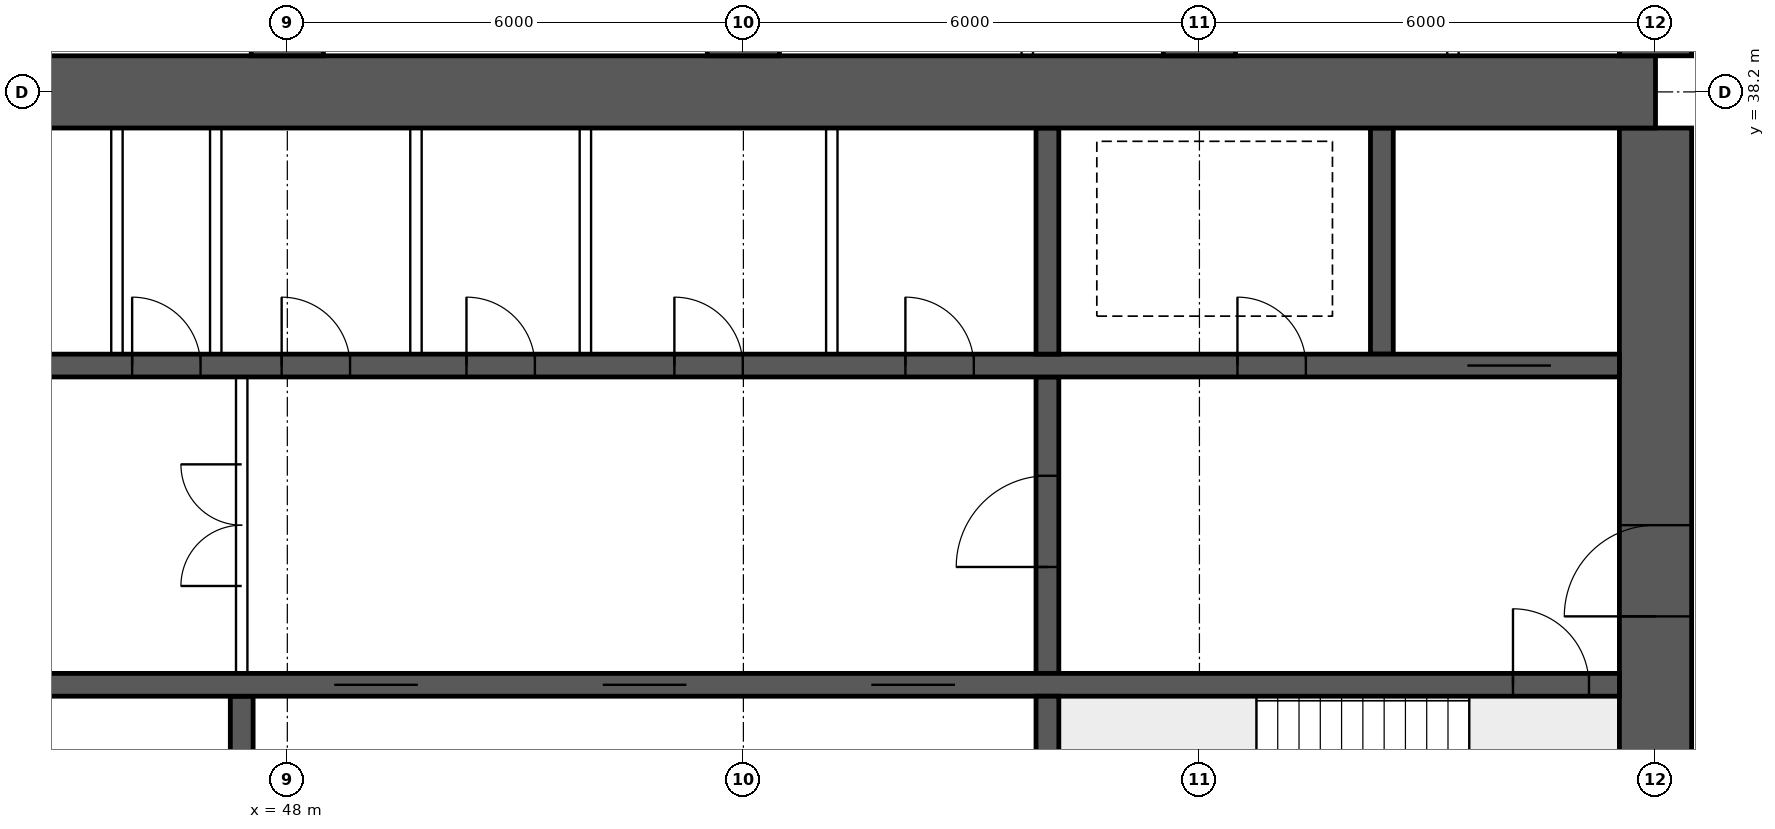
"""IFC4 building model, lengths in metres.
Left out: names, types, materials, properties, quantities, classifications, styles, units other than length and angle.
Written with IfcOpenShell. Run it as: python <this file> out.ifc"""

import sys

from ifc_helpers import new_model, si_unit, direction, frame, frame_2d, origin, place, context, subcontext, project, spatial, rectangle, extrude, element, fill, save


model = new_model("IFC4")
c1 = context("Model", 3, precision=1e-05, world=origin(), true_north=direction((0.0, 1.0)))
c2 = subcontext(c1, "Body", "Model", "MODEL_VIEW")
j1 = project(units=[si_unit("LENGTHUNIT", "METRE"), si_unit("PLANEANGLEUNIT", "RADIAN")], contexts=[c1])
p1 = place(None, origin())
s1 = spatial("IfcSite", under=j1, at=p1, CompositionType="ELEMENT")
p2 = place(p1, origin())
s2 = spatial("IfcBuilding", under=s1, at=p2, CompositionType="ELEMENT")
p3 = place(p2, frame((0.0, 0.0, 121.9)))
s3 = spatial("IfcBuildingStorey", under=s2, at=p3, CompositionType="ELEMENT", Elevation=121.9)
p4 = place(p3, frame((18.0, 38.2, 0.0), z_axis=(0.0, 0.0, 1.0), x_axis=(1.0, 0.0, 0.0)))
e1 = element("IfcWall", 1, at=p4, inside=s3, PredefinedType="SHEAR", context=c2, shape_type="SweptSolid", body=[
    extrude(rectangle(XDim=48.0, YDim=0.95, at=frame_2d((24.0, 0.0))), origin(), (0.0, 0.0, 1.0), 3.75),
])
p5 = place(p3, frame((66.0, 26.275, 0.0), z_axis=(0.0, 0.0, 1.0), x_axis=(0.0, 1.0, 0.0)))
e2 = element("IfcWall", 2, at=p5, inside=s3, PredefinedType="SHEAR", context=c2, shape_type="SweptSolid", body=[
    extrude(rectangle(XDim=11.45, YDim=0.95, at=frame_2d((5.725, 0.0))), origin(), (0.0, 0.0, 1.0), 3.75),
])
p6 = place(p5, frame((5.025, 0.0, 0.0)))
e3 = element("IfcOpeningElement", 3, at=p6, cuts=e2, PredefinedType="OPENING", context=c2, shape_type="SweptSolid", body=[
    extrude(rectangle(XDim=1.2, YDim=2.1, at=frame_2d((0.6, 1.05))), frame((0.0, 0.485, 0.0), z_axis=(0.0, -1.0, 0.0), x_axis=(1.0, 0.0, 0.0)), (0.0, 0.0, 1.0), 0.97),
])
p7 = place(p3, frame((18.475, 30.4, 0.0), z_axis=(0.0, 0.0, 1.0), x_axis=(1.0, 0.0, 0.0)))
e4 = element("IfcWall", 4, at=p7, inside=s3, PredefinedType="SHEAR", context=c2, shape_type="SweptSolid", body=[
    extrude(rectangle(XDim=47.05, YDim=0.3, at=frame_2d((23.525, 0.0))), origin(), (0.0, 0.0, 1.0), 3.75),
])
p8 = place(p7, frame((0.4, 0.0, 0.0)))
e5 = element("IfcOpeningElement", 5, at=p8, cuts=e4, PredefinedType="OPENING", context=c2, shape_type="SweptSolid", body=[
    extrude(rectangle(XDim=1.0, YDim=2.1, at=frame_2d((0.5, 1.05))), frame((0.0, 0.16, 0.0), z_axis=(0.0, -1.0, 0.0), x_axis=(1.0, 0.0, 0.0)), (0.0, 0.0, 1.0), 0.32),
])
p9 = place(p7, frame((45.65, 0.0, 0.0)))
e6 = element("IfcOpeningElement", 6, at=p9, cuts=e4, PredefinedType="OPENING", context=c2, shape_type="SweptSolid", body=[
    extrude(rectangle(XDim=1.0, YDim=2.1, at=frame_2d((0.5, 1.05))), frame((0.0, 0.16, 0.0), z_axis=(0.0, -1.0, 0.0), x_axis=(1.0, 0.0, 0.0)), (0.0, 0.0, 1.0), 0.32),
])
p10 = place(p7, frame((8.275, 0.0, 0.0)))
e7 = element("IfcOpeningElement", 7, at=p10, cuts=e4, PredefinedType="OPENING", context=c2, shape_type="SweptSolid", body=[
    extrude(rectangle(XDim=1.1, YDim=2.1, at=frame_2d((0.55, 1.05))), frame((0.0, 0.16, 0.0), z_axis=(0.0, -1.0, 0.0), x_axis=(1.0, 0.0, 0.0)), (0.0, 0.0, 1.0), 0.32),
])
p11 = place(p7, frame((10.875, 0.0, 0.0)))
e8 = element("IfcOpeningElement", 8, at=p11, cuts=e4, PredefinedType="OPENING", context=c2, shape_type="SweptSolid", body=[
    extrude(rectangle(XDim=1.1, YDim=2.1, at=frame_2d((0.55, 1.05))), frame((0.0, 0.16, 0.0), z_axis=(0.0, -1.0, 0.0), x_axis=(1.0, 0.0, 0.0)), (0.0, 0.0, 1.0), 0.32),
])
p12 = place(p7, frame((13.475, 0.0, 0.0)))
e9 = element("IfcOpeningElement", 9, at=p12, cuts=e4, PredefinedType="OPENING", context=c2, shape_type="SweptSolid", body=[
    extrude(rectangle(XDim=1.1, YDim=2.1, at=frame_2d((0.55, 1.05))), frame((0.0, 0.16, 0.0), z_axis=(0.0, -1.0, 0.0), x_axis=(1.0, 0.0, 0.0)), (0.0, 0.0, 1.0), 0.32),
])
p13 = place(p7, frame((16.075, 0.0, 0.0)))
e10 = element("IfcOpeningElement", 10, at=p13, cuts=e4, PredefinedType="OPENING", context=c2, shape_type="SweptSolid", body=[
    extrude(rectangle(XDim=1.1, YDim=2.1, at=frame_2d((0.55, 1.05))), frame((0.0, 0.16, 0.0), z_axis=(0.0, -1.0, 0.0), x_axis=(1.0, 0.0, 0.0)), (0.0, 0.0, 1.0), 0.32),
])
p14 = place(p7, frame((18.85, 0.0, 0.0)))
e11 = element("IfcOpeningElement", 11, at=p14, cuts=e4, PredefinedType="OPENING", context=c2, shape_type="SweptSolid", body=[
    extrude(rectangle(XDim=0.9, YDim=2.1, at=frame_2d((0.45, 1.05))), frame((0.0, 0.16, 0.0), z_axis=(0.0, -1.0, 0.0), x_axis=(1.0, 0.0, 0.0)), (0.0, 0.0, 1.0), 0.32),
])
p15 = place(p7, frame((30.142, 0.0, 0.0)))
e12 = element("IfcOpeningElement", 12, at=p15, cuts=e4, PredefinedType="OPENING", context=c2, shape_type="SweptSolid", body=[
    extrude(rectangle(XDim=1.1, YDim=2.1, at=frame_2d((0.55, 1.05))), frame((0.0, 0.16, 0.0), z_axis=(0.0, -1.0, 0.0), x_axis=(1.0, 0.0, 0.0)), (0.0, 0.0, 1.0), 0.32),
])
p16 = place(p7, frame((33.675, 0.0, 0.0)))
e13 = element("IfcOpeningElement", 13, at=p16, cuts=e4, PredefinedType="OPENING", context=c2, shape_type="SweptSolid", body=[
    extrude(rectangle(XDim=1.1, YDim=2.1, at=frame_2d((0.55, 1.05))), frame((0.0, 0.16, 0.0), z_axis=(0.0, -1.0, 0.0), x_axis=(1.0, 0.0, 0.0)), (0.0, 0.0, 1.0), 0.32),
])
p17 = place(p7, frame((37.208, 0.0, 0.0)))
e14 = element("IfcOpeningElement", 14, at=p17, cuts=e4, PredefinedType="OPENING", context=c2, shape_type="SweptSolid", body=[
    extrude(rectangle(XDim=1.1, YDim=2.1, at=frame_2d((0.55, 1.05))), frame((0.0, 0.16, 0.0), z_axis=(0.0, -1.0, 0.0), x_axis=(1.0, 0.0, 0.0)), (0.0, 0.0, 1.0), 0.32),
])
p18 = place(p3, frame((18.475, 34.6, 0.0), z_axis=(0.0, 0.0, 1.0), x_axis=(1.0, 0.0, 0.0)))
e15 = element("IfcWall", 15, at=p18, inside=s3, PredefinedType="SHEAR", context=c2, shape_type="SweptSolid", body=[
    extrude(rectangle(XDim=47.05, YDim=0.3, at=frame_2d((23.525, 0.0))), origin(), (0.0, 0.0, 1.0), 3.75),
])
p19 = place(p18, frame((0.9, 0.0, 0.0)))
e16 = element("IfcOpeningElement", 16, at=p19, cuts=e15, PredefinedType="OPENING", context=c2, shape_type="SweptSolid", body=[
    extrude(rectangle(XDim=1.1, YDim=2.1, at=frame_2d((0.55, 1.05))), frame((0.0, 0.16, 0.0), z_axis=(0.0, -1.0, 0.0), x_axis=(1.0, 0.0, 0.0)), (0.0, 0.0, 1.0), 0.32),
])
p20 = place(p18, frame((45.05, 0.0, 0.0)))
e17 = element("IfcOpeningElement", 17, at=p20, cuts=e15, PredefinedType="OPENING", context=c2, shape_type="SweptSolid", body=[
    extrude(rectangle(XDim=1.1, YDim=2.1, at=frame_2d((0.55, 1.05))), frame((0.0, 0.16, 0.0), z_axis=(0.0, -1.0, 0.0), x_axis=(1.0, 0.0, 0.0)), (0.0, 0.0, 1.0), 0.32),
])
p21 = place(p18, frame((4.125, 0.0, 0.0)))
e18 = element("IfcOpeningElement", 18, at=p21, cuts=e15, PredefinedType="OPENING", context=c2, shape_type="SweptSolid", body=[
    extrude(rectangle(XDim=0.9, YDim=2.1, at=frame_2d((0.45, 1.05))), frame((0.0, 0.16, 0.0), z_axis=(0.0, -1.0, 0.0), x_axis=(1.0, 0.0, 0.0)), (0.0, 0.0, 1.0), 0.32),
])
p22 = place(p18, frame((42.025, 0.0, 0.0)))
e19 = element("IfcOpeningElement", 19, at=p22, cuts=e15, PredefinedType="OPENING", context=c2, shape_type="SweptSolid", body=[
    extrude(rectangle(XDim=0.9, YDim=2.1, at=frame_2d((0.45, 1.05))), frame((0.0, 0.16, 0.0), z_axis=(0.0, -1.0, 0.0), x_axis=(1.0, 0.0, 0.0)), (0.0, 0.0, 1.0), 0.32),
])
p23 = place(p18, frame((8.9, 0.0, 0.0)))
e20 = element("IfcOpeningElement", 20, at=p23, cuts=e15, PredefinedType="OPENING", context=c2, shape_type="SweptSolid", body=[
    extrude(rectangle(XDim=0.9, YDim=2.1, at=frame_2d((0.45, 1.05))), frame((0.0, 0.16, 0.0), z_axis=(0.0, -1.0, 0.0), x_axis=(1.0, 0.0, 0.0)), (0.0, 0.0, 1.0), 0.32),
])
p24 = place(p18, frame((12.874, 0.0, 0.0)))
e21 = element("IfcOpeningElement", 21, at=p24, cuts=e15, PredefinedType="OPENING", context=c2, shape_type="SweptSolid", body=[
    extrude(rectangle(XDim=0.9, YDim=2.1, at=frame_2d((0.45, 1.05))), frame((0.0, 0.16, 0.0), z_axis=(0.0, -1.0, 0.0), x_axis=(1.0, 0.0, 0.0)), (0.0, 0.0, 1.0), 0.32),
])
p25 = place(p18, frame((16.521, 0.0, 0.0)))
e22 = element("IfcOpeningElement", 22, at=p25, cuts=e15, PredefinedType="OPENING", context=c2, shape_type="SweptSolid", body=[
    extrude(rectangle(XDim=0.9, YDim=2.1, at=frame_2d((0.45, 1.05))), frame((0.0, 0.16, 0.0), z_axis=(0.0, -1.0, 0.0), x_axis=(1.0, 0.0, 0.0)), (0.0, 0.0, 1.0), 0.32),
])
p26 = place(p18, frame((20.28, 0.0, 0.0)))
e23 = element("IfcOpeningElement", 23, at=p26, cuts=e15, PredefinedType="OPENING", context=c2, shape_type="SweptSolid", body=[
    extrude(rectangle(XDim=0.9, YDim=2.1, at=frame_2d((0.45, 1.05))), frame((0.0, 0.16, 0.0), z_axis=(0.0, -1.0, 0.0), x_axis=(1.0, 0.0, 0.0)), (0.0, 0.0, 1.0), 0.32),
])
p27 = place(p18, frame((24.686, 0.0, 0.0)))
e24 = element("IfcOpeningElement", 24, at=p27, cuts=e15, PredefinedType="OPENING", context=c2, shape_type="SweptSolid", body=[
    extrude(rectangle(XDim=0.9, YDim=2.1, at=frame_2d((0.45, 1.05))), frame((0.0, 0.16, 0.0), z_axis=(0.0, -1.0, 0.0), x_axis=(1.0, 0.0, 0.0)), (0.0, 0.0, 1.0), 0.32),
])
p28 = place(p18, frame((27.483, 0.0, 0.0)))
e25 = element("IfcOpeningElement", 25, at=p28, cuts=e15, PredefinedType="OPENING", context=c2, shape_type="SweptSolid", body=[
    extrude(rectangle(XDim=0.9, YDim=2.1, at=frame_2d((0.45, 1.05))), frame((0.0, 0.16, 0.0), z_axis=(0.0, -1.0, 0.0), x_axis=(1.0, 0.0, 0.0)), (0.0, 0.0, 1.0), 0.32),
])
p29 = place(p18, frame((29.45, 0.0, 0.0)))
e26 = element("IfcOpeningElement", 26, at=p29, cuts=e15, PredefinedType="OPENING", context=c2, shape_type="SweptSolid", body=[
    extrude(rectangle(XDim=0.9, YDim=2.1, at=frame_2d((0.45, 1.05))), frame((0.0, 0.16, 0.0), z_axis=(0.0, -1.0, 0.0), x_axis=(1.0, 0.0, 0.0)), (0.0, 0.0, 1.0), 0.32),
])
p30 = place(p18, frame((31.882, 0.0, 0.0)))
e27 = element("IfcOpeningElement", 27, at=p30, cuts=e15, PredefinedType="OPENING", context=c2, shape_type="SweptSolid", body=[
    extrude(rectangle(XDim=0.9, YDim=2.1, at=frame_2d((0.45, 1.05))), frame((0.0, 0.16, 0.0), z_axis=(0.0, -1.0, 0.0), x_axis=(1.0, 0.0, 0.0)), (0.0, 0.0, 1.0), 0.32),
])
p31 = place(p18, frame((34.617, 0.0, 0.0)))
e28 = element("IfcOpeningElement", 28, at=p31, cuts=e15, PredefinedType="OPENING", context=c2, shape_type="SweptSolid", body=[
    extrude(rectangle(XDim=0.9, YDim=2.1, at=frame_2d((0.45, 1.05))), frame((0.0, 0.16, 0.0), z_axis=(0.0, -1.0, 0.0), x_axis=(1.0, 0.0, 0.0)), (0.0, 0.0, 1.0), 0.32),
])
p32 = place(p18, frame((37.656, 0.0, 0.0)))
e29 = element("IfcOpeningElement", 29, at=p32, cuts=e15, PredefinedType="OPENING", context=c2, shape_type="SweptSolid", body=[
    extrude(rectangle(XDim=0.9, YDim=2.1, at=frame_2d((0.45, 1.05))), frame((0.0, 0.16, 0.0), z_axis=(0.0, -1.0, 0.0), x_axis=(1.0, 0.0, 0.0)), (0.0, 0.0, 1.0), 0.32),
])
p33 = place(p3, frame((58.0, 26.275, 0.0), z_axis=(0.0, 0.0, 1.0), x_axis=(0.0, 1.0, 0.0)))
e30 = element("IfcWall", 30, at=p33, inside=s3, PredefinedType="SHEAR", context=c2, shape_type="SweptSolid", body=[
    extrude(rectangle(XDim=3.975, YDim=0.3, at=frame_2d((1.988, 0.0))), origin(), (0.0, 0.0, 1.0), 3.75),
])
p34 = place(p3, frame((58.0, 30.55, 0.0), z_axis=(0.0, 0.0, 1.0), x_axis=(0.0, 1.0, 0.0)))
e31 = element("IfcWall", 31, at=p34, inside=s3, PredefinedType="SHEAR", context=c2, shape_type="SweptSolid", body=[
    extrude(rectangle(XDim=3.9, YDim=0.3, at=frame_2d((1.95, 0.0))), origin(), (0.0, 0.0, 1.0), 3.75),
])
p35 = place(p34, frame((1.4, 0.0, 0.0)))
e32 = element("IfcOpeningElement", 32, at=p35, cuts=e31, PredefinedType="OPENING", context=c2, shape_type="SweptSolid", body=[
    extrude(rectangle(XDim=1.2, YDim=2.1, at=frame_2d((0.6, 1.05))), frame((0.0, 0.16, 0.0), z_axis=(0.0, -1.0, 0.0), x_axis=(1.0, 0.0, 0.0)), (0.0, 0.0, 1.0), 0.32),
])
for number, where, z_axis, x_axis in (
    (33, (62.4, 34.75, 0.0), (0.0, 0.0, 1.0), (0.0, 1.0, 0.0)),
    (34, (58.0, 34.75, 0.0), (0.0, 0.0, 1.0), (0.0, 1.0, 0.0)),
):
    element("IfcWall", number, at=place(p3, frame(where, z_axis=z_axis, x_axis=x_axis)), inside=s3, PredefinedType="SHEAR", context=c2, shape_type="SweptSolid", body=[
        extrude(rectangle(XDim=2.975, YDim=0.3, at=frame_2d((1.488, 0.0))), origin(), (0.0, 0.0, 1.0), 3.75),
    ])
p36 = place(p3, frame((47.4, 26.275, 0.0), z_axis=(0.0, 0.0, 1.0), x_axis=(0.0, 1.0, 0.0)))
e35 = element("IfcWall", 35, at=p36, inside=s3, PredefinedType="SHEAR", context=c2, shape_type="SweptSolid", body=[
    extrude(rectangle(XDim=3.975, YDim=0.3, at=frame_2d((1.988, 0.0))), origin(), (0.0, 0.0, 1.0), 3.75),
])
for number, where, z_axis, x_axis in (
    (36, (48.0, 38.675, 0.0), (0.0, 0.0, 1.0), (0.0, 1.0, 0.0)),
    (37, (54.0, 38.675, 0.0), (0.0, 0.0, 1.0), (0.0, 1.0, 0.0)),
    (38, (60.0, 38.675, 0.0), (0.0, 0.0, 1.0), (0.0, 1.0, 0.0)),
    (39, (66.0, 38.675, 0.0), (0.0, 0.0, 1.0), (0.0, 1.0, 0.0)),
):
    element("IfcWall", number, at=place(p3, frame(where, z_axis=z_axis, x_axis=x_axis)), inside=s3, PredefinedType="SHEAR", context=c2, shape_type="SweptSolid", body=[
        extrude(rectangle(XDim=9.325, YDim=0.95, at=frame_2d((4.663, 0.0))), origin(), (0.0, 0.0, 1.0), 3.75),
    ])
p37 = place(p3, frame((47.4, 30.55, 0.0), z_axis=(0.0, 0.0, 1.0), x_axis=(0.0, 1.0, 0.0)))
e40 = element("IfcWall", 40, at=p37, inside=s3, PredefinedType="SOLIDWALL", context=c2, shape_type="SweptSolid", body=[
    extrude(rectangle(XDim=3.9, YDim=0.15, at=frame_2d((1.95, 0.0))), origin(), (0.0, 0.0, 1.0), 3.5),
])
p38 = place(p37, frame((1.15, 0.0, 0.0)))
e41 = element("IfcOpeningElement", 41, at=p38, cuts=e40, PredefinedType="OPENING", context=c2, shape_type="SweptSolid", body=[
    extrude(rectangle(XDim=1.6, YDim=2.1, at=frame_2d((0.8, 1.05))), frame((0.0, 0.085, 0.0), z_axis=(0.0, -1.0, 0.0), x_axis=(1.0, 0.0, 0.0)), (0.0, 0.0, 1.0), 0.17),
])
for number, where, z_axis, x_axis in (
    (42, (45.758, 34.75, 0.0), (0.0, 0.0, 1.0), (0.0, 1.0, 0.0)),
    (43, (47.058, 34.75, 0.0), (0.0, 0.0, 1.0), (0.0, 1.0, 0.0)),
    (44, (49.692, 34.75, 0.0), (0.0, 0.0, 1.0), (0.0, 1.0, 0.0)),
    (45, (51.921, 34.75, 0.0), (0.0, 0.0, 1.0), (0.0, 1.0, 0.0)),
    (46, (55.163, 34.75, 0.0), (0.0, 0.0, 1.0), (0.0, 1.0, 0.0)),
):
    element("IfcWall", number, at=place(p3, frame(where, z_axis=z_axis, x_axis=x_axis)), inside=s3, PredefinedType="SOLIDWALL", context=c2, shape_type="SweptSolid", body=[
        extrude(rectangle(XDim=2.975, YDim=0.15, at=frame_2d((1.488, 0.0))), origin(), (0.0, 0.0, 1.0), 3.5),
    ])
for number, where, z_axis, x_axis in (
    (47, (57.735, 38.675, 0.0), (0.0, 0.0, 1.0), (0.0, 1.0, 0.0)),
    (48, (63.335, 38.675, 0.0), (0.0, 0.0, 1.0), (0.0, 1.0, 0.0)),
):
    element("IfcWall", number, at=place(p3, frame(where, z_axis=z_axis, x_axis=x_axis)), inside=s3, PredefinedType="PARTITIONING", context=c2, shape_type="SweptSolid", body=[
        extrude(rectangle(XDim=9.225, YDim=0.15, at=frame_2d((4.612, 0.0))), origin(), (0.0, 0.0, 1.0), 3.5),
    ])
p39 = place(p38, origin())
e49 = element("IfcDoor", 49, at=p39, inside=s3, OperationType="DOUBLE_DOOR_SINGLE_SWING", PredefinedType="DOOR", context=c2, shape_type="SweptSolid", body=[
    extrude(rectangle(XDim=1.6, YDim=2.1, at=frame_2d((0.8, 1.05))), frame((0.0, 0.025, 0.0), z_axis=(0.0, -1.0, 0.0), x_axis=(1.0, 0.0, 0.0)), (0.0, 0.0, 1.0), 0.05),
])
fill(e41, e49)
p40 = place(p6, origin())
e50 = element("IfcDoor", 50, at=p40, inside=s3, OperationType="SINGLE_SWING_LEFT", PredefinedType="DOOR", context=c2, shape_type="SweptSolid", body=[
    extrude(rectangle(XDim=1.2, YDim=2.1, at=frame_2d((0.6, 1.05))), frame((0.0, 0.025, 0.0), z_axis=(0.0, -1.0, 0.0), x_axis=(1.0, 0.0, 0.0)), (0.0, 0.0, 1.0), 0.05),
])
fill(e3, e50)
p41 = place(p9, origin())
e51 = element("IfcDoor", 51, at=p41, inside=s3, OperationType="SINGLE_SWING_LEFT", PredefinedType="DOOR", context=c2, shape_type="SweptSolid", body=[
    extrude(rectangle(XDim=1.0, YDim=2.1, at=frame_2d((0.5, 1.05))), frame((0.0, 0.025, 0.0), z_axis=(0.0, -1.0, 0.0), x_axis=(1.0, 0.0, 0.0)), (0.0, 0.0, 1.0), 0.05),
])
fill(e6, e51)
p42 = place(p20, origin())
e52 = element("IfcDoor", 52, at=p42, inside=s3, OperationType="DOUBLE_DOOR_SLIDING", PredefinedType="DOOR", context=c2, shape_type="SweptSolid", body=[
    extrude(rectangle(XDim=1.1, YDim=2.1, at=frame_2d((0.55, 1.05))), frame((0.0, 0.025, 0.0), z_axis=(0.0, -1.0, 0.0), x_axis=(1.0, 0.0, 0.0)), (0.0, 0.0, 1.0), 0.05),
])
fill(e17, e52)
p43 = place(p22, origin())
e53 = element("IfcDoor", 53, at=p43, inside=s3, OperationType="SINGLE_SWING_LEFT", PredefinedType="DOOR", context=c2, shape_type="SweptSolid", body=[
    extrude(rectangle(XDim=0.9, YDim=2.1, at=frame_2d((0.45, 1.05))), frame((0.0, 0.025, 0.0), z_axis=(0.0, -1.0, 0.0), x_axis=(1.0, 0.0, 0.0)), (0.0, 0.0, 1.0), 0.05),
])
fill(e19, e53)
p44 = place(p35, origin())
e54 = element("IfcDoor", 54, at=p44, inside=s3, OperationType="SINGLE_SWING_LEFT", PredefinedType="DOOR", context=c2, shape_type="SweptSolid", body=[
    extrude(rectangle(XDim=1.2, YDim=2.1, at=frame_2d((0.6, 1.05))), frame((0.0, 0.025, 0.0), z_axis=(0.0, -1.0, 0.0), x_axis=(1.0, 0.0, 0.0)), (0.0, 0.0, 1.0), 0.05),
])
fill(e32, e54)
p45 = place(p28, origin())
e55 = element("IfcDoor", 55, at=p45, inside=s3, OperationType="SINGLE_SWING_LEFT", PredefinedType="DOOR", context=c2, shape_type="SweptSolid", body=[
    extrude(rectangle(XDim=0.9, YDim=2.1, at=frame_2d((0.45, 1.05))), frame((0.0, 0.025, 0.0), z_axis=(0.0, -1.0, 0.0), x_axis=(1.0, 0.0, 0.0)), (0.0, 0.0, 1.0), 0.05),
])
fill(e25, e55)
p46 = place(p29, origin())
e56 = element("IfcDoor", 56, at=p46, inside=s3, OperationType="SINGLE_SWING_LEFT", PredefinedType="DOOR", context=c2, shape_type="SweptSolid", body=[
    extrude(rectangle(XDim=0.9, YDim=2.1, at=frame_2d((0.45, 1.05))), frame((0.0, 0.025, 0.0), z_axis=(0.0, -1.0, 0.0), x_axis=(1.0, 0.0, 0.0)), (0.0, 0.0, 1.0), 0.05),
])
fill(e26, e56)
p47 = place(p30, origin())
e57 = element("IfcDoor", 57, at=p47, inside=s3, OperationType="SINGLE_SWING_LEFT", PredefinedType="DOOR", context=c2, shape_type="SweptSolid", body=[
    extrude(rectangle(XDim=0.9, YDim=2.1, at=frame_2d((0.45, 1.05))), frame((0.0, 0.025, 0.0), z_axis=(0.0, -1.0, 0.0), x_axis=(1.0, 0.0, 0.0)), (0.0, 0.0, 1.0), 0.05),
])
fill(e27, e57)
p48 = place(p31, origin())
e58 = element("IfcDoor", 58, at=p48, inside=s3, OperationType="SINGLE_SWING_LEFT", PredefinedType="DOOR", context=c2, shape_type="SweptSolid", body=[
    extrude(rectangle(XDim=0.9, YDim=2.1, at=frame_2d((0.45, 1.05))), frame((0.0, 0.025, 0.0), z_axis=(0.0, -1.0, 0.0), x_axis=(1.0, 0.0, 0.0)), (0.0, 0.0, 1.0), 0.05),
])
fill(e28, e58)
p49 = place(p32, origin())
e59 = element("IfcDoor", 59, at=p49, inside=s3, OperationType="SINGLE_SWING_LEFT", PredefinedType="DOOR", context=c2, shape_type="SweptSolid", body=[
    extrude(rectangle(XDim=0.9, YDim=2.1, at=frame_2d((0.45, 1.05))), frame((0.0, 0.025, 0.0), z_axis=(0.0, -1.0, 0.0), x_axis=(1.0, 0.0, 0.0)), (0.0, 0.0, 1.0), 0.05),
])
fill(e29, e59)
p50 = place(p15, origin())
e60 = element("IfcDoor", 60, at=p50, inside=s3, OperationType="DOUBLE_DOOR_SLIDING", PredefinedType="DOOR", context=c2, shape_type="SweptSolid", body=[
    extrude(rectangle(XDim=1.1, YDim=2.1, at=frame_2d((0.55, 1.05))), frame((0.0, 0.025, 0.0), z_axis=(0.0, -1.0, 0.0), x_axis=(1.0, 0.0, 0.0)), (0.0, 0.0, 1.0), 0.05),
])
fill(e12, e60)
p51 = place(p16, origin())
e61 = element("IfcDoor", 61, at=p51, inside=s3, OperationType="DOUBLE_DOOR_SLIDING", PredefinedType="DOOR", context=c2, shape_type="SweptSolid", body=[
    extrude(rectangle(XDim=1.1, YDim=2.1, at=frame_2d((0.55, 1.05))), frame((0.0, 0.025, 0.0), z_axis=(0.0, -1.0, 0.0), x_axis=(1.0, 0.0, 0.0)), (0.0, 0.0, 1.0), 0.05),
])
fill(e13, e61)
p52 = place(p17, origin())
e62 = element("IfcDoor", 62, at=p52, inside=s3, OperationType="DOUBLE_DOOR_SLIDING", PredefinedType="DOOR", context=c2, shape_type="SweptSolid", body=[
    extrude(rectangle(XDim=1.1, YDim=2.1, at=frame_2d((0.55, 1.05))), frame((0.0, 0.025, 0.0), z_axis=(0.0, -1.0, 0.0), x_axis=(1.0, 0.0, 0.0)), (0.0, 0.0, 1.0), 0.05),
])
fill(e14, e62)
save(model, sys.argv[1])
